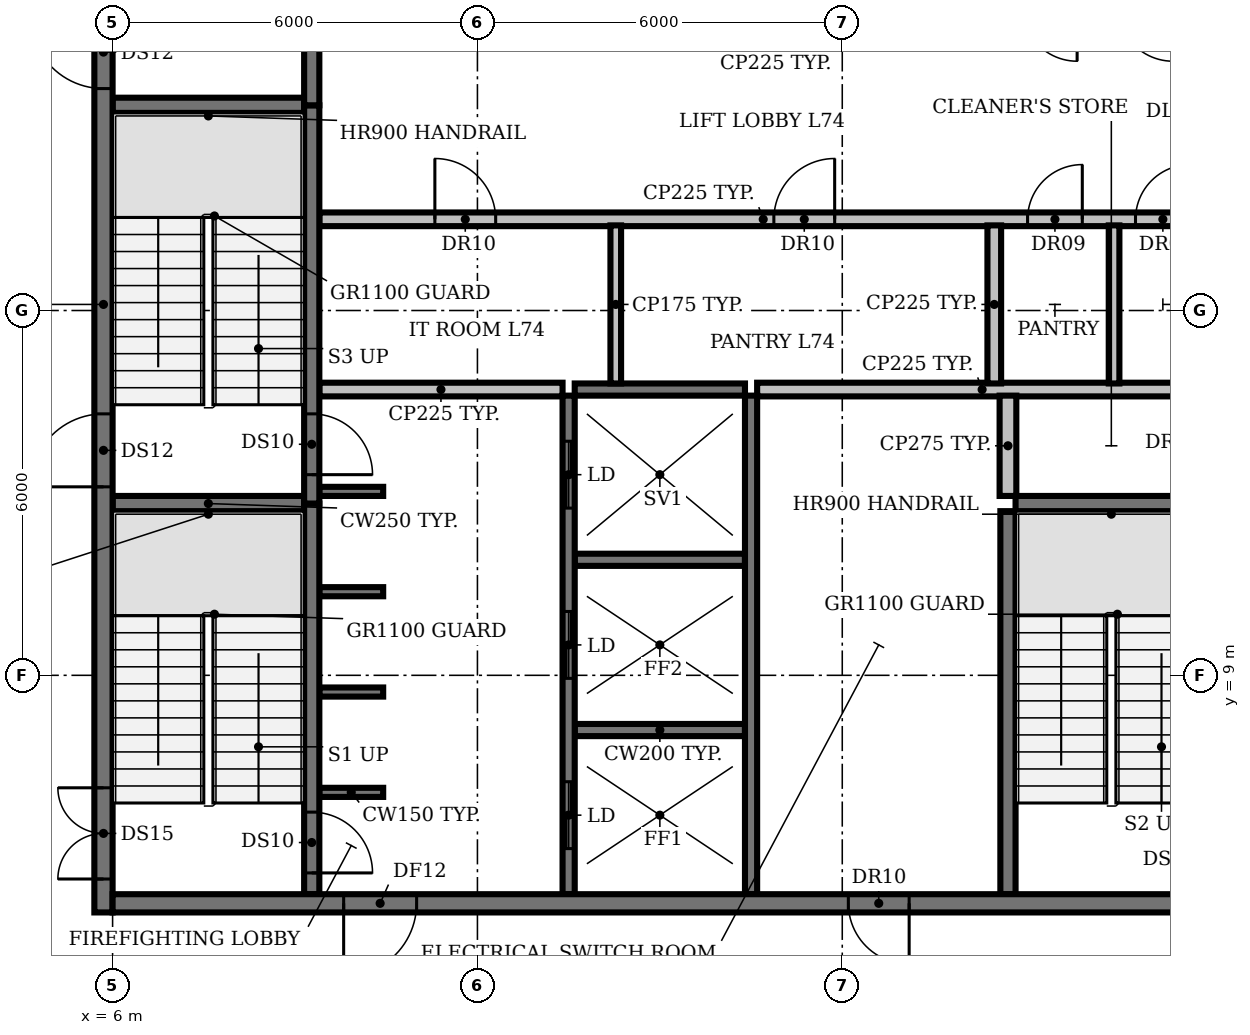
"""IFC4 building model, lengths in metres.
Left out: names, types, materials, properties, quantities, classifications, styles, units other than length and angle.
Written with IfcOpenShell. Run it as: python <this file> out.ifc"""

import sys

from ifc_helpers import new_model, si_unit, direction, frame, frame_2d, origin, place, context, subcontext, project, spatial, rectangle, extrude, element, fill, save


model = new_model("IFC4")
c1 = context("Model", 3, precision=1e-05, world=origin(), true_north=direction((0.0, 1.0)))
c2 = subcontext(c1, "Body", "Model", "MODEL_VIEW")
j1 = project(units=[si_unit("LENGTHUNIT", "METRE"), si_unit("PLANEANGLEUNIT", "RADIAN")], contexts=[c1])
p1 = place(None, origin())
s1 = spatial("IfcSite", under=j1, at=p1, CompositionType="ELEMENT")
p2 = place(p1, origin())
s2 = spatial("IfcBuilding", under=s1, at=p2, CompositionType="ELEMENT")
p3 = place(p2, frame((0.0, 0.0, 331.4)))
s3 = spatial("IfcBuildingStorey", under=s2, at=p3, CompositionType="ELEMENT", Elevation=331.4)
p4 = place(p3, frame((9.4, 7.075, 0.0), z_axis=(0.0, 0.0, 1.0), x_axis=(1.0, 0.0, 0.0)))
e1 = element("IfcWall", 1, at=p4, inside=s3, PredefinedType="SHEAR", context=c2, shape_type="SweptSolid", body=[
    extrude(rectangle(XDim=1.05, YDim=0.15, at=frame_2d((0.525, 0.0))), origin(), (0.0, 0.0, 1.0), 3.9),
])
p5 = place(p3, frame((13.6, 8.1, 0.0), z_axis=(0.0, 0.0, 1.0), x_axis=(1.0, 0.0, 0.0)))
e2 = element("IfcWall", 2, at=p5, inside=s3, PredefinedType="SHEAR", context=c2, shape_type="SweptSolid", body=[
    extrude(rectangle(XDim=2.8, YDim=0.2, at=frame_2d((1.4, 0.0))), origin(), (0.0, 0.0, 1.0), 3.9),
])
for number, where, z_axis, x_axis in (
    (3, (9.4, 8.725, 0.0), (0.0, 0.0, 1.0), (1.0, 0.0, 0.0)),
    (4, (9.4, 10.375, 0.0), (0.0, 0.0, 1.0), (1.0, 0.0, 0.0)),
):
    element("IfcWall", number, at=place(p3, frame(where, z_axis=z_axis, x_axis=x_axis)), inside=s3, PredefinedType="SHEAR", context=c2, shape_type="SweptSolid", body=[
        extrude(rectangle(XDim=1.05, YDim=0.15, at=frame_2d((0.525, 0.0))), origin(), (0.0, 0.0, 1.0), 3.9),
    ])
p6 = place(p3, frame((13.6, 10.9, 0.0), z_axis=(0.0, 0.0, 1.0), x_axis=(1.0, 0.0, 0.0)))
e5 = element("IfcWall", 5, at=p6, inside=s3, PredefinedType="SHEAR", context=c2, shape_type="SweptSolid", body=[
    extrude(rectangle(XDim=2.8, YDim=0.2, at=frame_2d((1.4, 0.0))), origin(), (0.0, 0.0, 1.0), 3.9),
])
for number, where, z_axis, x_axis in (
    (6, (6.0, 11.825, 0.0), (0.0, 0.0, 1.0), (1.0, 0.0, 0.0)),
    (7, (20.85, 11.825, 0.0), (0.0, 0.0, 1.0), (1.0, 0.0, 0.0)),
):
    element("IfcWall", number, at=place(p3, frame(where, z_axis=z_axis, x_axis=x_axis)), inside=s3, PredefinedType="SHEAR", context=c2, shape_type="SweptSolid", body=[
        extrude(rectangle(XDim=3.15, YDim=0.25, at=frame_2d((1.575, 0.0))), origin(), (0.0, 0.0, 1.0), 3.9),
    ])
p7 = place(p3, frame((9.4, 12.025, 0.0), z_axis=(0.0, 0.0, 1.0), x_axis=(1.0, 0.0, 0.0)))
e8 = element("IfcWall", 8, at=p7, inside=s3, PredefinedType="SHEAR", context=c2, shape_type="SweptSolid", body=[
    extrude(rectangle(XDim=1.05, YDim=0.15, at=frame_2d((0.525, 0.0))), origin(), (0.0, 0.0, 1.0), 3.9),
])
p8 = place(p3, frame((9.4, 13.7, 0.0), z_axis=(0.0, 0.0, 1.0), x_axis=(1.0, 0.0, 0.0)))
e9 = element("IfcWall", 9, at=p8, inside=s3, PredefinedType="PARTITIONING", context=c2, shape_type="SweptSolid", body=[
    extrude(rectangle(XDim=4.0, YDim=0.225, at=frame_2d((2.0, 0.0))), origin(), (0.0, 0.0, 1.0), 3.9),
])
p9 = place(p3, frame((13.6, 13.7, 0.0), z_axis=(0.0, 0.0, 1.0), x_axis=(1.0, 0.0, 0.0)))
e10 = element("IfcWall", 10, at=p9, inside=s3, PredefinedType="SHEAR", context=c2, shape_type="SweptSolid", body=[
    extrude(rectangle(XDim=2.8, YDim=0.2, at=frame_2d((1.4, 0.0))), origin(), (0.0, 0.0, 1.0), 3.9),
])
p10 = place(p3, frame((16.6, 13.7, 0.0), z_axis=(0.0, 0.0, 1.0), x_axis=(1.0, 0.0, 0.0)))
e11 = element("IfcWall", 11, at=p10, inside=s3, PredefinedType="PARTITIONING", context=c2, shape_type="SweptSolid", body=[
    extrude(rectangle(XDim=7.4, YDim=0.225, at=frame_2d((3.7, 0.0))), origin(), (0.0, 0.0, 1.0), 3.9),
])
p11 = place(p3, frame((9.4, 16.5, 0.0), z_axis=(0.0, 0.0, 1.0), x_axis=(1.0, 0.0, 0.0)))
e12 = element("IfcWall", 12, at=p11, inside=s3, PredefinedType="PARTITIONING", context=c2, shape_type="SweptSolid", body=[
    extrude(rectangle(XDim=14.6, YDim=0.225, at=frame_2d((7.3, 0.0))), origin(), (0.0, 0.0, 1.0), 3.9),
])
p12 = place(p11, frame((1.9, 0.0, 0.0)))
e13 = element("IfcOpeningElement", 13, at=p12, cuts=e12, PredefinedType="OPENING", context=c2, shape_type="SweptSolid", body=[
    extrude(rectangle(XDim=1.0, YDim=2.1, at=frame_2d((0.5, 1.05))), frame((0.0, 0.123, 0.0), z_axis=(0.0, -1.0, 0.0), x_axis=(1.0, 0.0, 0.0)), (0.0, 0.0, 1.0), 0.245),
])
p13 = place(p11, frame((7.475, 0.0, 0.0)))
e14 = element("IfcOpeningElement", 14, at=p13, cuts=e12, PredefinedType="OPENING", context=c2, shape_type="SweptSolid", body=[
    extrude(rectangle(XDim=1.0, YDim=2.1, at=frame_2d((0.5, 1.05))), frame((0.0, 0.123, 0.0), z_axis=(0.0, -1.0, 0.0), x_axis=(1.0, 0.0, 0.0)), (0.0, 0.0, 1.0), 0.245),
])
p14 = place(p11, frame((11.647, 0.0, 0.0)))
e15 = element("IfcOpeningElement", 15, at=p14, cuts=e12, PredefinedType="OPENING", context=c2, shape_type="SweptSolid", body=[
    extrude(rectangle(XDim=0.9, YDim=2.1, at=frame_2d((0.45, 1.05))), frame((0.0, 0.123, 0.0), z_axis=(0.0, -1.0, 0.0), x_axis=(1.0, 0.0, 0.0)), (0.0, 0.0, 1.0), 0.245),
])
p15 = place(p11, frame((13.423, 0.0, 0.0)))
e16 = element("IfcOpeningElement", 16, at=p15, cuts=e12, PredefinedType="OPENING", context=c2, shape_type="SweptSolid", body=[
    extrude(rectangle(XDim=0.9, YDim=2.1, at=frame_2d((0.45, 1.05))), frame((0.0, 0.123, 0.0), z_axis=(0.0, -1.0, 0.0), x_axis=(1.0, 0.0, 0.0)), (0.0, 0.0, 1.0), 0.245),
])
p16 = place(p3, frame((6.0, 18.375, 0.0), z_axis=(0.0, 0.0, 1.0), x_axis=(1.0, 0.0, 0.0)))
e17 = element("IfcWall", 17, at=p16, inside=s3, PredefinedType="SHEAR", context=c2, shape_type="SweptSolid", body=[
    extrude(rectangle(XDim=3.15, YDim=0.25, at=frame_2d((1.575, 0.0))), origin(), (0.0, 0.0, 1.0), 3.9),
])
p17 = place(p3, frame((9.275, 11.825, 0.0), z_axis=(0.0, 0.0, 1.0), x_axis=(0.0, -1.0, 0.0)))
e18 = element("IfcWall", 18, at=p17, inside=s3, PredefinedType="SHEAR", context=c2, shape_type="SweptSolid", body=[
    extrude(rectangle(XDim=6.425, YDim=0.25, at=frame_2d((3.212, 0.0))), origin(), (0.0, 0.0, 1.0), 3.9),
])
p18 = place(p17, frame((5.075, 0.0, 0.0)))
e19 = element("IfcOpeningElement", 19, at=p18, cuts=e18, PredefinedType="OPENING", context=c2, shape_type="SweptSolid", body=[
    extrude(rectangle(XDim=1.0, YDim=2.1, at=frame_2d((0.5, 1.05))), frame((0.0, 0.135, 0.0), z_axis=(0.0, -1.0, 0.0), x_axis=(1.0, 0.0, 0.0)), (0.0, 0.0, 1.0), 0.27),
])
p19 = place(p3, frame((9.275, 18.375, 0.0), z_axis=(0.0, 0.0, 1.0), x_axis=(0.0, -1.0, 0.0)))
e20 = element("IfcWall", 20, at=p19, inside=s3, PredefinedType="SHEAR", context=c2, shape_type="SweptSolid", body=[
    extrude(rectangle(XDim=6.55, YDim=0.25, at=frame_2d((3.275, 0.0))), origin(), (0.0, 0.0, 1.0), 3.9),
])
p20 = place(p19, frame((5.075, 0.0, 0.0)))
e21 = element("IfcOpeningElement", 21, at=p20, cuts=e20, PredefinedType="OPENING", context=c2, shape_type="SweptSolid", body=[
    extrude(rectangle(XDim=1.0, YDim=2.1, at=frame_2d((0.5, 1.05))), frame((0.0, 0.135, 0.0), z_axis=(0.0, -1.0, 0.0), x_axis=(1.0, 0.0, 0.0)), (0.0, 0.0, 1.0), 0.27),
])
p21 = place(p3, frame((9.275, 18.375, 0.0), z_axis=(0.0, 0.0, 1.0), x_axis=(0.0, 1.0, 0.0)))
e22 = element("IfcWall", 22, at=p21, inside=s3, PredefinedType="SHEAR", context=c2, shape_type="SweptSolid", body=[
    extrude(rectangle(XDim=6.425, YDim=0.25, at=frame_2d((3.212, 0.0))), origin(), (0.0, 0.0, 1.0), 3.9),
])
p22 = place(p3, frame((13.5, 5.4, 0.0), z_axis=(0.0, 0.0, 1.0), x_axis=(0.0, 1.0, 0.0)))
e23 = element("IfcWall", 23, at=p22, inside=s3, PredefinedType="SHEAR", context=c2, shape_type="SweptSolid", body=[
    extrude(rectangle(XDim=8.2, YDim=0.2, at=frame_2d((4.1, 0.0))), origin(), (0.0, 0.0, 1.0), 3.9),
])
p23 = place(p22, frame((0.75, 0.0, 0.0)))
e24 = element("IfcOpeningElement", 24, at=p23, cuts=e23, PredefinedType="OPENING", context=c2, shape_type="SweptSolid", body=[
    extrude(rectangle(XDim=1.1, YDim=2.1, at=frame_2d((0.55, 1.05))), frame((0.0, 0.11, 0.0), z_axis=(0.0, -1.0, 0.0), x_axis=(1.0, 0.0, 0.0)), (0.0, 0.0, 1.0), 0.22),
])
p24 = place(p22, frame((3.55, 0.0, 0.0)))
e25 = element("IfcOpeningElement", 25, at=p24, cuts=e23, PredefinedType="OPENING", context=c2, shape_type="SweptSolid", body=[
    extrude(rectangle(XDim=1.1, YDim=2.1, at=frame_2d((0.55, 1.05))), frame((0.0, 0.11, 0.0), z_axis=(0.0, -1.0, 0.0), x_axis=(1.0, 0.0, 0.0)), (0.0, 0.0, 1.0), 0.22),
])
p25 = place(p22, frame((6.35, 0.0, 0.0)))
e26 = element("IfcOpeningElement", 26, at=p25, cuts=e23, PredefinedType="OPENING", context=c2, shape_type="SweptSolid", body=[
    extrude(rectangle(XDim=1.1, YDim=2.1, at=frame_2d((0.55, 1.05))), frame((0.0, 0.11, 0.0), z_axis=(0.0, -1.0, 0.0), x_axis=(1.0, 0.0, 0.0)), (0.0, 0.0, 1.0), 0.22),
])
p26 = place(p3, frame((14.275, 13.8, 0.0), z_axis=(0.0, 0.0, 1.0), x_axis=(0.0, 1.0, 0.0)))
e27 = element("IfcWall", 27, at=p26, inside=s3, PredefinedType="PARTITIONING", context=c2, shape_type="SweptSolid", body=[
    extrude(rectangle(XDim=2.6, YDim=0.175, at=frame_2d((1.3, 0.0))), origin(), (0.0, 0.0, 1.0), 3.9),
])
p27 = place(p3, frame((16.5, 5.4, 0.0), z_axis=(0.0, 0.0, 1.0), x_axis=(0.0, 1.0, 0.0)))
e28 = element("IfcWall", 28, at=p27, inside=s3, PredefinedType="SHEAR", context=c2, shape_type="SweptSolid", body=[
    extrude(rectangle(XDim=8.2, YDim=0.2, at=frame_2d((4.1, 0.0))), origin(), (0.0, 0.0, 1.0), 3.9),
])
p28 = place(p3, frame((20.5, 13.8, 0.0), z_axis=(0.0, 0.0, 1.0), x_axis=(0.0, 1.0, 0.0)))
e29 = element("IfcWall", 29, at=p28, inside=s3, PredefinedType="PARTITIONING", context=c2, shape_type="SweptSolid", body=[
    extrude(rectangle(XDim=2.6, YDim=0.225, at=frame_2d((1.3, 0.0))), origin(), (0.0, 0.0, 1.0), 3.9),
])
p29 = place(p3, frame((20.725, 5.4, 0.0), z_axis=(0.0, 0.0, 1.0), x_axis=(0.0, 1.0, 0.0)))
e30 = element("IfcWall", 30, at=p29, inside=s3, PredefinedType="SHEAR", context=c2, shape_type="SweptSolid", body=[
    extrude(rectangle(XDim=6.3, YDim=0.25, at=frame_2d((3.15, 0.0))), origin(), (0.0, 0.0, 1.0), 3.9),
])
p30 = place(p3, frame((20.725, 11.95, 0.0), z_axis=(0.0, 0.0, 1.0), x_axis=(0.0, 1.0, 0.0)))
e31 = element("IfcWall", 31, at=p30, inside=s3, PredefinedType="PARTITIONING", context=c2, shape_type="SweptSolid", body=[
    extrude(rectangle(XDim=1.65, YDim=0.275, at=frame_2d((0.825, 0.0))), origin(), (0.0, 0.0, 1.0), 3.9),
])
p31 = place(p3, frame((22.47, 13.8, 0.0), z_axis=(0.0, 0.0, 1.0), x_axis=(0.0, 1.0, 0.0)))
e32 = element("IfcWall", 32, at=p31, inside=s3, PredefinedType="PARTITIONING", context=c2, shape_type="SweptSolid", body=[
    extrude(rectangle(XDim=2.6, YDim=0.175, at=frame_2d((1.3, 0.0))), origin(), (0.0, 0.0, 1.0), 3.9),
])
p32 = place(p3, frame((5.85, 5.1, 0.0), z_axis=(0.0, 0.0, 1.0), x_axis=(0.0, 1.0, 0.0)))
e33 = element("IfcWall", 33, at=p32, inside=s3, PredefinedType="SHEAR", context=c2, shape_type="SweptSolid", body=[
    extrude(rectangle(XDim=20.0, YDim=0.3, at=frame_2d((10.0, 0.0))), origin(), (0.0, 0.0, 1.0), 3.9),
])
p33 = place(p32, frame((0.55, 0.0, 0.0)))
e34 = element("IfcOpeningElement", 34, at=p33, cuts=e33, PredefinedType="OPENING", context=c2, shape_type="SweptSolid", body=[
    extrude(rectangle(XDim=1.5, YDim=2.1, at=frame_2d((0.75, 1.05))), frame((0.0, 0.16, 0.0), z_axis=(0.0, -1.0, 0.0), x_axis=(1.0, 0.0, 0.0)), (0.0, 0.0, 1.0), 0.32),
])
p34 = place(p32, frame((7.0, 0.0, 0.0)))
e35 = element("IfcOpeningElement", 35, at=p34, cuts=e33, PredefinedType="OPENING", context=c2, shape_type="SweptSolid", body=[
    extrude(rectangle(XDim=1.2, YDim=2.1, at=frame_2d((0.6, 1.05))), frame((0.0, 0.16, 0.0), z_axis=(0.0, -1.0, 0.0), x_axis=(1.0, 0.0, 0.0)), (0.0, 0.0, 1.0), 0.32),
])
p35 = place(p32, frame((13.55, 0.0, 0.0)))
e36 = element("IfcOpeningElement", 36, at=p35, cuts=e33, PredefinedType="OPENING", context=c2, shape_type="SweptSolid", body=[
    extrude(rectangle(XDim=1.2, YDim=2.1, at=frame_2d((0.6, 1.05))), frame((0.0, 0.16, 0.0), z_axis=(0.0, -1.0, 0.0), x_axis=(1.0, 0.0, 0.0)), (0.0, 0.0, 1.0), 0.32),
])
p36 = place(p3, frame((24.0, 5.25, 0.0), z_axis=(0.0, 0.0, 1.0), x_axis=(-1.0, 0.0, 0.0)))
e37 = element("IfcWall", 37, at=p36, inside=s3, PredefinedType="SHEAR", context=c2, shape_type="SweptSolid", body=[
    extrude(rectangle(XDim=18.0, YDim=0.3, at=frame_2d((9.0, 0.0))), origin(), (0.0, 0.0, 1.0), 3.9),
])
p37 = place(p36, frame((13.0, 0.0, 0.0)))
e38 = element("IfcOpeningElement", 38, at=p37, cuts=e37, PredefinedType="OPENING", context=c2, shape_type="SweptSolid", body=[
    extrude(rectangle(XDim=1.2, YDim=2.1, at=frame_2d((0.6, 1.05))), frame((0.0, 0.16, 0.0), z_axis=(0.0, -1.0, 0.0), x_axis=(1.0, 0.0, 0.0)), (0.0, 0.0, 1.0), 0.32),
])
p38 = place(p36, frame((4.9, 0.0, 0.0)))
e39 = element("IfcOpeningElement", 39, at=p38, cuts=e37, PredefinedType="OPENING", context=c2, shape_type="SweptSolid", body=[
    extrude(rectangle(XDim=1.0, YDim=2.1, at=frame_2d((0.5, 1.05))), frame((0.0, 0.16, 0.0), z_axis=(0.0, -1.0, 0.0), x_axis=(1.0, 0.0, 0.0)), (0.0, 0.0, 1.0), 0.32),
])
p39 = place(p12, origin())
e40 = element("IfcDoor", 40, at=p39, inside=s3, OperationType="SINGLE_SWING_LEFT", PredefinedType="DOOR", context=c2, shape_type="SweptSolid", body=[
    extrude(rectangle(XDim=1.0, YDim=2.1, at=frame_2d((0.5, 1.05))), frame((0.0, 0.025, 0.0), z_axis=(0.0, -1.0, 0.0), x_axis=(1.0, 0.0, 0.0)), (0.0, 0.0, 1.0), 0.05),
])
fill(e13, e40)
p40 = place(p13, origin())
e41 = element("IfcDoor", 41, at=p40, inside=s3, OperationType="SINGLE_SWING_RIGHT", PredefinedType="DOOR", context=c2, shape_type="SweptSolid", body=[
    extrude(rectangle(XDim=1.0, YDim=2.1, at=frame_2d((0.5, 1.05))), frame((0.0, 0.025, 0.0), z_axis=(0.0, -1.0, 0.0), x_axis=(1.0, 0.0, 0.0)), (0.0, 0.0, 1.0), 0.05),
])
fill(e14, e41)
p41 = place(p14, origin())
e42 = element("IfcDoor", 42, at=p41, inside=s3, OperationType="SINGLE_SWING_RIGHT", PredefinedType="DOOR", context=c2, shape_type="SweptSolid", body=[
    extrude(rectangle(XDim=0.9, YDim=2.1, at=frame_2d((0.45, 1.05))), frame((0.0, 0.025, 0.0), z_axis=(0.0, -1.0, 0.0), x_axis=(1.0, 0.0, 0.0)), (0.0, 0.0, 1.0), 0.05),
])
fill(e15, e42)
p42 = place(p15, origin())
e43 = element("IfcDoor", 43, at=p42, inside=s3, OperationType="SINGLE_SWING_RIGHT", PredefinedType="DOOR", context=c2, shape_type="SweptSolid", body=[
    extrude(rectangle(XDim=0.9, YDim=2.1, at=frame_2d((0.45, 1.05))), frame((0.0, 0.025, 0.0), z_axis=(0.0, -1.0, 0.0), x_axis=(1.0, 0.0, 0.0)), (0.0, 0.0, 1.0), 0.05),
])
fill(e16, e43)
p43 = place(p18, origin())
e44 = element("IfcDoor", 44, at=p43, inside=s3, OperationType="SINGLE_SWING_RIGHT", PredefinedType="DOOR", context=c2, shape_type="SweptSolid", body=[
    extrude(rectangle(XDim=1.0, YDim=2.1, at=frame_2d((0.5, 1.05))), frame((0.0, 0.025, 0.0), z_axis=(0.0, -1.0, 0.0), x_axis=(1.0, 0.0, 0.0)), (0.0, 0.0, 1.0), 0.05),
])
fill(e19, e44)
p44 = place(p20, origin())
e45 = element("IfcDoor", 45, at=p44, inside=s3, OperationType="SINGLE_SWING_RIGHT", PredefinedType="DOOR", context=c2, shape_type="SweptSolid", body=[
    extrude(rectangle(XDim=1.0, YDim=2.1, at=frame_2d((0.5, 1.05))), frame((0.0, 0.025, 0.0), z_axis=(0.0, -1.0, 0.0), x_axis=(1.0, 0.0, 0.0)), (0.0, 0.0, 1.0), 0.05),
])
fill(e21, e45)
p45 = place(p23, origin())
e46 = element("IfcDoor", 46, at=p45, inside=s3, OperationType="DOUBLE_DOOR_SLIDING", PredefinedType="DOOR", context=c2, shape_type="SweptSolid", body=[
    extrude(rectangle(XDim=1.1, YDim=2.1, at=frame_2d((0.55, 1.05))), frame((0.0, 0.025, 0.0), z_axis=(0.0, -1.0, 0.0), x_axis=(1.0, 0.0, 0.0)), (0.0, 0.0, 1.0), 0.05),
])
fill(e24, e46)
p46 = place(p24, origin())
e47 = element("IfcDoor", 47, at=p46, inside=s3, OperationType="DOUBLE_DOOR_SLIDING", PredefinedType="DOOR", context=c2, shape_type="SweptSolid", body=[
    extrude(rectangle(XDim=1.1, YDim=2.1, at=frame_2d((0.55, 1.05))), frame((0.0, 0.025, 0.0), z_axis=(0.0, -1.0, 0.0), x_axis=(1.0, 0.0, 0.0)), (0.0, 0.0, 1.0), 0.05),
])
fill(e25, e47)
p47 = place(p25, origin())
e48 = element("IfcDoor", 48, at=p47, inside=s3, OperationType="DOUBLE_DOOR_SLIDING", PredefinedType="DOOR", context=c2, shape_type="SweptSolid", body=[
    extrude(rectangle(XDim=1.1, YDim=2.1, at=frame_2d((0.55, 1.05))), frame((0.0, 0.025, 0.0), z_axis=(0.0, -1.0, 0.0), x_axis=(1.0, 0.0, 0.0)), (0.0, 0.0, 1.0), 0.05),
])
fill(e26, e48)
p48 = place(p33, origin())
e49 = element("IfcDoor", 49, at=p48, inside=s3, OperationType="DOUBLE_DOOR_SINGLE_SWING", PredefinedType="DOOR", context=c2, shape_type="SweptSolid", body=[
    extrude(rectangle(XDim=1.5, YDim=2.1, at=frame_2d((0.75, 1.05))), frame((0.0, 0.025, 0.0), z_axis=(0.0, -1.0, 0.0), x_axis=(1.0, 0.0, 0.0)), (0.0, 0.0, 1.0), 0.05),
])
fill(e34, e49)
p49 = place(p34, origin())
e50 = element("IfcDoor", 50, at=p49, inside=s3, OperationType="SINGLE_SWING_LEFT", PredefinedType="DOOR", context=c2, shape_type="SweptSolid", body=[
    extrude(rectangle(XDim=1.2, YDim=2.1, at=frame_2d((0.6, 1.05))), frame((0.0, 0.025, 0.0), z_axis=(0.0, -1.0, 0.0), x_axis=(1.0, 0.0, 0.0)), (0.0, 0.0, 1.0), 0.05),
])
fill(e35, e50)
p50 = place(p35, origin())
e51 = element("IfcDoor", 51, at=p50, inside=s3, OperationType="SINGLE_SWING_RIGHT", PredefinedType="DOOR", context=c2, shape_type="SweptSolid", body=[
    extrude(rectangle(XDim=1.2, YDim=2.1, at=frame_2d((0.6, 1.05))), frame((0.0, 0.025, 0.0), z_axis=(0.0, -1.0, 0.0), x_axis=(1.0, 0.0, 0.0)), (0.0, 0.0, 1.0), 0.05),
])
fill(e36, e51)
p51 = place(p37, origin())
e52 = element("IfcDoor", 52, at=p51, inside=s3, OperationType="SINGLE_SWING_RIGHT", PredefinedType="DOOR", context=c2, shape_type="SweptSolid", body=[
    extrude(rectangle(XDim=1.2, YDim=2.1, at=frame_2d((0.6, 1.05))), frame((0.0, 0.025, 0.0), z_axis=(0.0, -1.0, 0.0), x_axis=(1.0, 0.0, 0.0)), (0.0, 0.0, 1.0), 0.05),
])
fill(e38, e52)
p52 = place(p38, origin())
e53 = element("IfcDoor", 53, at=p52, inside=s3, OperationType="SINGLE_SWING_LEFT", PredefinedType="DOOR", context=c2, shape_type="SweptSolid", body=[
    extrude(rectangle(XDim=1.0, YDim=2.1, at=frame_2d((0.5, 1.05))), frame((0.0, 0.025, 0.0), z_axis=(0.0, -1.0, 0.0), x_axis=(1.0, 0.0, 0.0)), (0.0, 0.0, 1.0), 0.05),
])
fill(e39, e53)
save(model, sys.argv[1])
